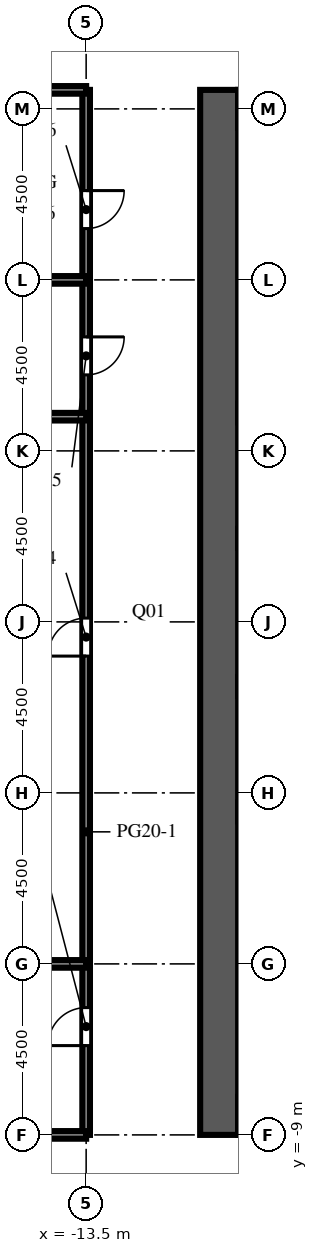
"""IFC4 building model, lengths in metres.
Left out: names, types, materials, properties, quantities, classifications, styles, units other than length and angle.
Written with IfcOpenShell. Run it as: python <this file> out.ifc"""

import sys

from ifc_helpers import new_model, si_unit, direction, frame, frame_2d, origin, place, context, subcontext, project, spatial, rectangle, extrude, element, fill, save


model = new_model("IFC4")
c1 = context("Model", 3, precision=1e-05, world=origin(), true_north=direction((0.0, 1.0)))
c2 = subcontext(c1, "Body", "Model", "MODEL_VIEW")
j1 = project(units=[si_unit("LENGTHUNIT", "METRE"), si_unit("PLANEANGLEUNIT", "RADIAN")], contexts=[c1])
p1 = place(None, origin())
s1 = spatial("IfcSite", under=j1, at=p1, CompositionType="ELEMENT")
p2 = place(p1, origin())
s2 = spatial("IfcBuilding", under=s1, at=p2, CompositionType="ELEMENT")
p3 = place(p2, frame((0.0, 0.0, 41.9)))
s3 = spatial("IfcBuildingStorey", under=s2, at=p3, CompositionType="ELEMENT", Elevation=41.9)
p4 = place(p3, frame((-10.0, -9.0, 0.0), z_axis=(0.0, 0.0, 1.0), x_axis=(0.0, 1.0, 0.0)))
e1 = element("IfcWall", 1, at=p4, inside=s3, PredefinedType="SHEAR", context=c2, shape_type="SweptSolid", body=[
    extrude(rectangle(XDim=27.5, YDim=1.0, at=frame_2d((13.75, 0.0))), origin(), (0.0, 0.0, 1.0), 4.1),
])
p5 = place(p4, frame((12.55, 0.0, 0.0)))
e2 = element("IfcOpeningElement", 2, at=p5, cuts=e1, PredefinedType="OPENING", context=c2, shape_type="SweptSolid", body=[
    extrude(rectangle(XDim=2.4, YDim=2.4, at=frame_2d((1.2, 1.2))), frame((0.0, 0.51, 0.0), z_axis=(0.0, -1.0, 0.0), x_axis=(1.0, 0.0, 0.0)), (0.0, 0.0, 1.0), 1.02),
])
p6 = place(p4, frame((6.825, 0.0, 0.0)))
e3 = element("IfcOpeningElement", 3, at=p6, cuts=e1, PredefinedType="OPENING", context=c2, shape_type="SweptSolid", body=[
    extrude(rectangle(XDim=1.2, YDim=2.1, at=frame_2d((0.6, 1.05))), frame((0.0, 0.51, 0.0), z_axis=(0.0, -1.0, 0.0), x_axis=(1.0, 0.0, 0.0)), (0.0, 0.0, 1.0), 1.02),
])
p7 = place(p4, frame((19.475, 0.0, 0.0)))
e4 = element("IfcOpeningElement", 4, at=p7, cuts=e1, PredefinedType="OPENING", context=c2, shape_type="SweptSolid", body=[
    extrude(rectangle(XDim=1.2, YDim=2.1, at=frame_2d((0.6, 1.05))), frame((0.0, 0.51, 0.0), z_axis=(0.0, -1.0, 0.0), x_axis=(1.0, 0.0, 0.0)), (0.0, 0.0, 1.0), 1.02),
])
p8 = place(p3, frame((-13.5, -9.0, 0.0), z_axis=(0.0, 0.0, 1.0), x_axis=(0.0, 1.0, 0.0)))
e5 = element("IfcWall", 5, at=p8, inside=s3, PredefinedType="PARTITIONING", context=c2, shape_type="SweptSolid", body=[
    extrude(rectangle(XDim=27.5, YDim=0.2, at=frame_2d((13.75, 0.0))), origin(), (0.0, 0.0, 1.0), 3.65),
])
p9 = place(p8, frame((2.35, 0.0, 0.0)))
e6 = element("IfcOpeningElement", 6, at=p9, cuts=e5, PredefinedType="OPENING", context=c2, shape_type="SweptSolid", body=[
    extrude(rectangle(XDim=1.0, YDim=2.1, at=frame_2d((0.5, 1.05))), frame((0.0, 0.11, 0.0), z_axis=(0.0, -1.0, 0.0), x_axis=(1.0, 0.0, 0.0)), (0.0, 0.0, 1.0), 0.22),
])
p10 = place(p8, frame((12.6, 0.0, 0.0)))
e7 = element("IfcOpeningElement", 7, at=p10, cuts=e5, PredefinedType="OPENING", context=c2, shape_type="SweptSolid", body=[
    extrude(rectangle(XDim=1.0, YDim=2.1, at=frame_2d((0.5, 1.05))), frame((0.0, 0.11, 0.0), z_axis=(0.0, -1.0, 0.0), x_axis=(1.0, 0.0, 0.0)), (0.0, 0.0, 1.0), 0.22),
])
p11 = place(p8, frame((20.0, 0.0, 0.0)))
e8 = element("IfcOpeningElement", 8, at=p11, cuts=e5, PredefinedType="OPENING", context=c2, shape_type="SweptSolid", body=[
    extrude(rectangle(XDim=1.0, YDim=2.1, at=frame_2d((0.5, 1.05))), frame((0.0, 0.11, 0.0), z_axis=(0.0, -1.0, 0.0), x_axis=(1.0, 0.0, 0.0)), (0.0, 0.0, 1.0), 0.22),
])
p12 = place(p8, frame((23.85, 0.0, 0.0)))
e9 = element("IfcOpeningElement", 9, at=p12, cuts=e5, PredefinedType="OPENING", context=c2, shape_type="SweptSolid", body=[
    extrude(rectangle(XDim=1.0, YDim=2.1, at=frame_2d((0.5, 1.05))), frame((0.0, 0.11, 0.0), z_axis=(0.0, -1.0, 0.0), x_axis=(1.0, 0.0, 0.0)), (0.0, 0.0, 1.0), 0.22),
])
p13 = place(p3, frame((-17.2, -9.0, 0.0), z_axis=(0.0, 0.0, 1.0), x_axis=(1.0, 0.0, 0.0)))
e10 = element("IfcWall", 10, at=p13, inside=s3, PredefinedType="PARTITIONING", context=c2, shape_type="SweptSolid", body=[
    extrude(rectangle(XDim=3.7, YDim=0.2, at=frame_2d((1.85, 0.0))), origin(), (0.0, 0.0, 1.0), 3.65),
])
p14 = place(p3, frame((-21.8, -4.5, 0.0), z_axis=(0.0, 0.0, 1.0), x_axis=(1.0, 0.0, 0.0)))
e11 = element("IfcWall", 11, at=p14, inside=s3, PredefinedType="PARTITIONING", context=c2, shape_type="SweptSolid", body=[
    extrude(rectangle(XDim=8.3, YDim=0.2, at=frame_2d((4.15, 0.0))), origin(), (0.0, 0.0, 1.0), 3.65),
])
p15 = place(p3, frame((-22.35, 9.9, 0.0), z_axis=(0.0, 0.0, 1.0), x_axis=(1.0, 0.0, 0.0)))
e12 = element("IfcWall", 12, at=p15, inside=s3, PredefinedType="PARTITIONING", context=c2, shape_type="SweptSolid", body=[
    extrude(rectangle(XDim=8.85, YDim=0.2, at=frame_2d((4.425, 0.0))), origin(), (0.0, 0.0, 1.0), 3.65),
])
p16 = place(p3, frame((-21.8, 13.5, 0.0), z_axis=(0.0, 0.0, 1.0), x_axis=(1.0, 0.0, 0.0)))
e13 = element("IfcWall", 13, at=p16, inside=s3, PredefinedType="PARTITIONING", context=c2, shape_type="SweptSolid", body=[
    extrude(rectangle(XDim=8.3, YDim=0.2, at=frame_2d((4.15, 0.0))), origin(), (0.0, 0.0, 1.0), 3.65),
])
p17 = place(p3, frame((-17.2, 18.5, 0.0), z_axis=(0.0, 0.0, 1.0), x_axis=(1.0, 0.0, 0.0)))
e14 = element("IfcWall", 14, at=p17, inside=s3, PredefinedType="PARTITIONING", context=c2, shape_type="SweptSolid", body=[
    extrude(rectangle(XDim=3.7, YDim=0.2, at=frame_2d((1.85, 0.0))), origin(), (0.0, 0.0, 1.0), 3.65),
])
p18 = place(p5, origin())
e15 = element("IfcDoor", 15, at=p18, inside=s3, OperationType="DOUBLE_DOOR_DOUBLE_SWING", PredefinedType="DOOR", context=c2, shape_type="SweptSolid", body=[
    extrude(rectangle(XDim=2.4, YDim=2.4, at=frame_2d((1.2, 1.2))), frame((0.0, 0.025, 0.0), z_axis=(0.0, -1.0, 0.0), x_axis=(1.0, 0.0, 0.0)), (0.0, 0.0, 1.0), 0.05),
])
fill(e2, e15)
p19 = place(p6, origin())
e16 = element("IfcDoor", 16, at=p19, inside=s3, OperationType="SINGLE_SWING_LEFT", PredefinedType="DOOR", context=c2, shape_type="SweptSolid", body=[
    extrude(rectangle(XDim=1.2, YDim=2.1, at=frame_2d((0.6, 1.05))), frame((0.0, 0.025, 0.0), z_axis=(0.0, -1.0, 0.0), x_axis=(1.0, 0.0, 0.0)), (0.0, 0.0, 1.0), 0.05),
])
fill(e3, e16)
p20 = place(p7, origin())
e17 = element("IfcDoor", 17, at=p20, inside=s3, OperationType="SINGLE_SWING_LEFT", PredefinedType="DOOR", context=c2, shape_type="SweptSolid", body=[
    extrude(rectangle(XDim=1.2, YDim=2.1, at=frame_2d((0.6, 1.05))), frame((0.0, 0.025, 0.0), z_axis=(0.0, -1.0, 0.0), x_axis=(1.0, 0.0, 0.0)), (0.0, 0.0, 1.0), 0.05),
])
fill(e4, e17)
p21 = place(p9, origin())
e18 = element("IfcDoor", 18, at=p21, inside=s3, OperationType="SINGLE_SWING_LEFT", PredefinedType="DOOR", context=c2, shape_type="SweptSolid", body=[
    extrude(rectangle(XDim=1.0, YDim=2.1, at=frame_2d((0.5, 1.05))), frame((0.0, 0.025, 0.0), z_axis=(0.0, -1.0, 0.0), x_axis=(1.0, 0.0, 0.0)), (0.0, 0.0, 1.0), 0.05),
])
fill(e6, e18)
p22 = place(p10, origin())
e19 = element("IfcDoor", 19, at=p22, inside=s3, OperationType="SINGLE_SWING_LEFT", PredefinedType="DOOR", context=c2, shape_type="SweptSolid", body=[
    extrude(rectangle(XDim=1.0, YDim=2.1, at=frame_2d((0.5, 1.05))), frame((0.0, 0.025, 0.0), z_axis=(0.0, -1.0, 0.0), x_axis=(1.0, 0.0, 0.0)), (0.0, 0.0, 1.0), 0.05),
])
fill(e7, e19)
p23 = place(p11, origin())
e20 = element("IfcDoor", 20, at=p23, inside=s3, OperationType="SINGLE_SWING_RIGHT", PredefinedType="DOOR", context=c2, shape_type="SweptSolid", body=[
    extrude(rectangle(XDim=1.0, YDim=2.1, at=frame_2d((0.5, 1.05))), frame((0.0, 0.025, 0.0), z_axis=(0.0, -1.0, 0.0), x_axis=(1.0, 0.0, 0.0)), (0.0, 0.0, 1.0), 0.05),
])
fill(e8, e20)
p24 = place(p12, origin())
e21 = element("IfcDoor", 21, at=p24, inside=s3, OperationType="SINGLE_SWING_RIGHT", PredefinedType="DOOR", context=c2, shape_type="SweptSolid", body=[
    extrude(rectangle(XDim=1.0, YDim=2.1, at=frame_2d((0.5, 1.05))), frame((0.0, 0.025, 0.0), z_axis=(0.0, -1.0, 0.0), x_axis=(1.0, 0.0, 0.0)), (0.0, 0.0, 1.0), 0.05),
])
fill(e9, e21)
save(model, sys.argv[1])
